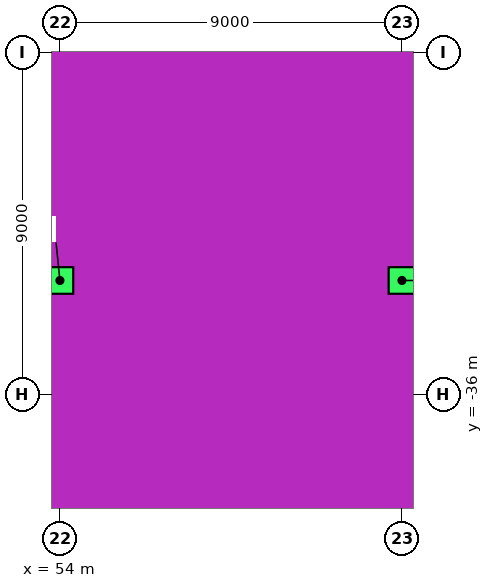
"""IFC4 building model, lengths in metres.
Left out: names, types, materials, properties, quantities, classifications, styles, units other than length and angle.
Written with IfcOpenShell. Run it as: python <this file> out.ifc"""

import sys

from ifc_helpers import new_model, si_unit, direction, frame, origin, origin_2d, place, context, subcontext, project, spatial, rectangle, extrude, element, save


model = new_model("IFC4")
c1 = context("Model", 3, precision=1e-05, world=origin(), true_north=direction((0.0, 1.0)))
c2 = subcontext(c1, "Body", "Model", "MODEL_VIEW")
j1 = project(units=[si_unit("LENGTHUNIT", "METRE"), si_unit("PLANEANGLEUNIT", "RADIAN")], contexts=[c1])
p1 = place(None, origin())
s1 = spatial("IfcSite", under=j1, at=p1, CompositionType="ELEMENT")
p2 = place(p1, origin())
s2 = spatial("IfcBuilding", under=s1, at=p2, CompositionType="ELEMENT")
p3 = place(p2, frame((0.0, 0.0, -4.5)))
s3 = spatial("IfcBuildingStorey", under=s2, at=p3, CompositionType="ELEMENT", Elevation=-4.5)
for number, where, z_axis, x_axis in (
    (1, (54.0, -33.0, 0.0), (0.0, 0.0, 1.0), (1.0, 0.0, 0.0)),
    (2, (63.0, -33.0, 0.0), (0.0, 0.0, 1.0), (1.0, 0.0, 0.0)),
):
    element("IfcColumn", number, at=place(p3, frame(where, z_axis=z_axis, x_axis=x_axis)), inside=s3, PredefinedType="COLUMN", context=c2, shape_type="SweptSolid", body=[
        extrude(rectangle(XDim=0.7, YDim=0.7, at=origin_2d()), origin(), (0.0, 0.0, 1.0), 4.0),
    ])
save(model, sys.argv[1])
